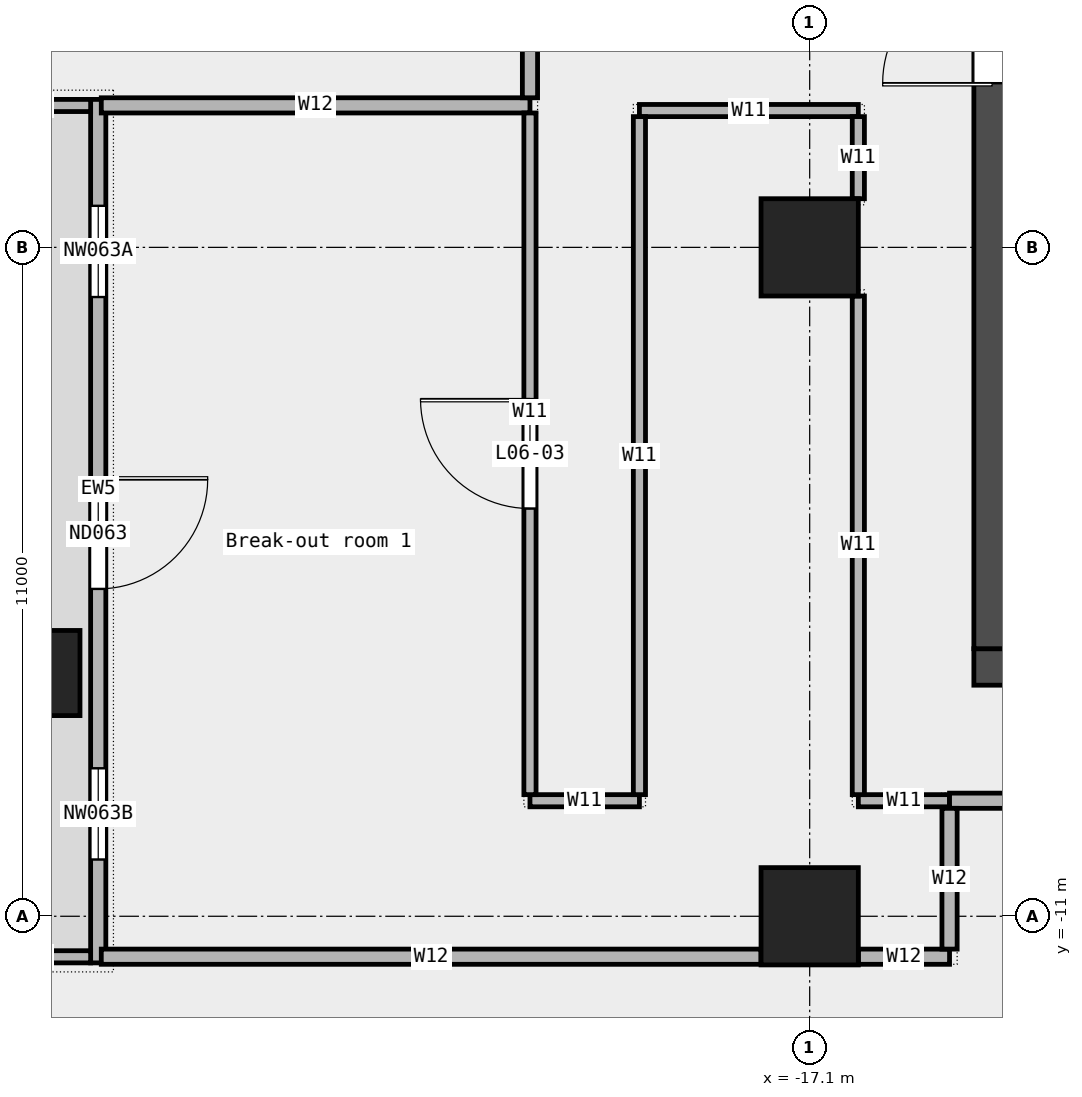
"""IFC4 building model, lengths in metres.
Left out: names, types, materials, properties, quantities, classifications, styles, units other than length and angle.
Written with IfcOpenShell. Run it as: python <this file> out.ifc"""

import sys

from ifc_helpers import new_model, si_unit, direction, frame, frame_2d, origin, origin_2d, place, context, subcontext, project, spatial, rectangle, extrude, element, fill, save


model = new_model("IFC4")
c1 = context("Model", 3, precision=1e-05, world=origin(), true_north=direction((0.0, 1.0)))
c2 = subcontext(c1, "Body", "Model", "MODEL_VIEW")
j1 = project(units=[si_unit("LENGTHUNIT", "METRE"), si_unit("PLANEANGLEUNIT", "RADIAN")], contexts=[c1])
p1 = place(None, origin())
s1 = spatial("IfcSite", under=j1, at=p1, CompositionType="ELEMENT")
p2 = place(p1, origin())
s2 = spatial("IfcBuilding", under=s1, at=p2, CompositionType="ELEMENT")
p3 = place(p2, frame((0.0, 0.0, 35.8)))
s3 = spatial("IfcBuildingStorey", under=s2, at=p3, CompositionType="ELEMENT", Elevation=35.8)
p4 = place(p3, frame((-29.8, -7.0, 0.0), z_axis=(0.0, 0.0, 1.0), x_axis=(1.0, 0.0, 0.0)))
e1 = element("IfcColumn", 1, at=p4, inside=s3, PredefinedType="COLUMN", context=c2, shape_type="SweptSolid", body=[
    extrude(rectangle(XDim=1.4, YDim=1.4, at=origin_2d()), origin(), (0.0, 0.0, 1.0), 4.35),
])
for number, where, z_axis, x_axis in (
    (2, (-17.1, -11.0, 0.0), (0.0, 0.0, 1.0), (1.0, 0.0, 0.0)),
    (3, (-17.1, 0.0, 0.0), (0.0, 0.0, 1.0), (1.0, 0.0, 0.0)),
):
    element("IfcColumn", number, at=place(p3, frame(where, z_axis=z_axis, x_axis=x_axis)), inside=s3, PredefinedType="COLUMN", context=c2, shape_type="SweptSolid", body=[
        extrude(rectangle(XDim=1.6, YDim=1.6, at=origin_2d()), origin(), (0.0, 0.0, 1.0), 4.35),
    ])
p5 = place(p3, frame((-28.8, 2.433, 0.0), z_axis=(0.0, 0.0, 1.0), x_axis=(0.0, -1.0, 0.0)))
e4 = element("IfcWall", 4, at=p5, inside=s3, PredefinedType="STANDARD", context=c2, shape_type="SweptSolid", body=[
    extrude(rectangle(XDim=14.2, YDim=0.25, at=frame_2d((7.1, 0.0))), origin(), (0.0, 0.0, 1.0), 4.35),
])
p6 = place(p5, frame((1.75, 0.0, 0.45)))
e5 = element("IfcOpeningElement", 5, at=p6, cuts=e4, PredefinedType="OPENING", context=c2, shape_type="SweptSolid", body=[
    extrude(rectangle(XDim=1.5, YDim=3.0, at=frame_2d((0.75, 1.5))), frame((0.0, 0.137, 0.0), z_axis=(0.0, -1.0, 0.0), x_axis=(1.0, 0.0, 0.0)), (0.0, 0.0, 1.0), 0.274),
])
p7 = place(p5, frame((6.25, 0.0, 0.0)))
e6 = element("IfcOpeningElement", 6, at=p7, cuts=e4, PredefinedType="OPENING", context=c2, shape_type="SweptSolid", body=[
    extrude(rectangle(XDim=1.8, YDim=2.4, at=frame_2d((0.9, 1.2))), frame((0.0, 0.137, 0.0), z_axis=(0.0, -1.0, 0.0), x_axis=(1.0, 0.0, 0.0)), (0.0, 0.0, 1.0), 0.274),
])
p8 = place(p5, frame((11.0, 0.0, 0.45)))
e7 = element("IfcOpeningElement", 7, at=p8, cuts=e4, PredefinedType="OPENING", context=c2, shape_type="SweptSolid", body=[
    extrude(rectangle(XDim=1.5, YDim=3.0, at=frame_2d((0.75, 1.5))), frame((0.0, 0.137, 0.0), z_axis=(0.0, -1.0, 0.0), x_axis=(1.0, 0.0, 0.0)), (0.0, 0.0, 1.0), 0.274),
])
for number, where, z_axis, x_axis in (
    (8, (-30.8, 2.333, 0.0), (0.0, 0.0, 1.0), (1.0, 0.0, 0.0)),
    (9, (-30.8, -11.667, 0.0), (0.0, 0.0, 1.0), (1.0, 0.0, 0.0)),
):
    element("IfcWall", number, at=place(p3, frame(where, z_axis=z_axis, x_axis=x_axis)), inside=s3, PredefinedType="STANDARD", context=c2, shape_type="SweptSolid", body=[
        extrude(rectangle(XDim=1.875, YDim=0.2, at=frame_2d((0.938, 0.0))), origin(), (0.0, 0.0, 1.0), 4.35),
    ])
p9 = place(p3, frame((-28.75, -11.665, 0.0), z_axis=(0.0, 0.0, 1.0), x_axis=(1.0, 0.0, 0.0)))
e10 = element("IfcWall", 10, at=p9, inside=s3, PredefinedType="PARTITIONING", context=c2, shape_type="SweptSolid", body=[
    extrude(rectangle(XDim=10.85, YDim=0.25, at=frame_2d((5.425, 0.0))), origin(), (0.0, 0.0, 1.0), 4.35),
])
p10 = place(p3, frame((-16.3, -11.665, 0.0), z_axis=(0.0, 0.0, 1.0), x_axis=(1.0, 0.0, 0.0)))
e11 = element("IfcWall", 11, at=p10, inside=s3, PredefinedType="PARTITIONING", context=c2, shape_type="SweptSolid", body=[
    extrude(rectangle(XDim=1.5, YDim=0.25, at=frame_2d((0.75, 0.0))), origin(), (0.0, 0.0, 1.0), 4.35),
])
p11 = place(p3, frame((-21.7, -9.1, 0.0), z_axis=(0.0, 0.0, 1.0), x_axis=(1.0, 0.0, 0.0)))
e12 = element("IfcWall", 12, at=p11, inside=s3, PredefinedType="PARTITIONING", context=c2, shape_type="SweptSolid", body=[
    extrude(rectangle(XDim=1.8, YDim=0.2, at=frame_2d((0.9, 0.0))), origin(), (0.0, 0.0, 1.0), 4.35),
])
p12 = place(p3, frame((-16.3, -9.1, 0.0), z_axis=(0.0, 0.0, 1.0), x_axis=(1.0, 0.0, 0.0)))
e13 = element("IfcWall", 13, at=p12, inside=s3, PredefinedType="PARTITIONING", context=c2, shape_type="SweptSolid", body=[
    extrude(rectangle(XDim=1.5, YDim=0.2, at=frame_2d((0.75, 0.0))), origin(), (0.0, 0.0, 1.0), 4.35),
])
p13 = place(p3, frame((-14.8, -9.1, 0.0), z_axis=(0.0, 0.0, 1.0), x_axis=(1.0, 0.0, 0.0)))
e14 = element("IfcWall", 14, at=p13, inside=s3, PredefinedType="PARTITIONING", context=c2, shape_type="SweptSolid", body=[
    extrude(rectangle(XDim=29.6, YDim=0.25, at=frame_2d((14.8, 0.0))), origin(), (0.0, 0.0, 1.0), 4.35),
])
p14 = place(p13, frame((22.998, 0.0, 0.0)))
e15 = element("IfcOpeningElement", 15, at=p14, cuts=e14, PredefinedType="OPENING", context=c2, shape_type="SweptSolid", body=[
    extrude(rectangle(XDim=1.8, YDim=2.1, at=frame_2d((0.9, 1.05))), frame((0.0, 0.137, 0.0), z_axis=(0.0, -1.0, 0.0), x_axis=(1.0, 0.0, 0.0)), (0.0, 0.0, 1.0), 0.274),
])
p15 = place(p13, frame((9.998, 0.0, 0.0)))
e16 = element("IfcOpeningElement", 16, at=p15, cuts=e14, PredefinedType="OPENING", context=c2, shape_type="SweptSolid", body=[
    extrude(rectangle(XDim=1.8, YDim=2.1, at=frame_2d((0.9, 1.05))), frame((0.0, 0.137, 0.0), z_axis=(0.0, -1.0, 0.0), x_axis=(1.0, 0.0, 0.0)), (0.0, 0.0, 1.0), 0.274),
])
p16 = place(p3, frame((-19.9, 2.25, 0.0), z_axis=(0.0, 0.0, 1.0), x_axis=(1.0, 0.0, 0.0)))
e17 = element("IfcWall", 17, at=p16, inside=s3, PredefinedType="PARTITIONING", context=c2, shape_type="SweptSolid", body=[
    extrude(rectangle(XDim=3.6, YDim=0.2, at=frame_2d((1.8, 0.0))), origin(), (0.0, 0.0, 1.0), 4.35),
])
p17 = place(p3, frame((-28.75, 2.335, 0.0), z_axis=(0.0, 0.0, 1.0), x_axis=(1.0, 0.0, 0.0)))
e18 = element("IfcWall", 18, at=p17, inside=s3, PredefinedType="PARTITIONING", context=c2, shape_type="SweptSolid", body=[
    extrude(rectangle(XDim=7.05, YDim=0.25, at=frame_2d((3.525, 0.0))), origin(), (0.0, 0.0, 1.0), 4.35),
])
p18 = place(p3, frame((-21.7, -9.0, 0.0), z_axis=(0.0, 0.0, 1.0), x_axis=(0.0, 1.0, 0.0)))
e19 = element("IfcWall", 19, at=p18, inside=s3, PredefinedType="PARTITIONING", context=c2, shape_type="SweptSolid", body=[
    extrude(rectangle(XDim=11.21, YDim=0.2, at=frame_2d((5.605, 0.0))), origin(), (0.0, 0.0, 1.0), 4.35),
])
p19 = place(p18, frame((4.705, 0.0, 0.0)))
e20 = element("IfcOpeningElement", 20, at=p19, cuts=e19, PredefinedType="OPENING", context=c2, shape_type="SweptSolid", body=[
    extrude(rectangle(XDim=1.8, YDim=2.1, at=frame_2d((0.9, 1.05))), frame((0.0, 0.112, 0.0), z_axis=(0.0, -1.0, 0.0), x_axis=(1.0, 0.0, 0.0)), (0.0, 0.0, 1.0), 0.224),
])
p20 = place(p3, frame((-21.7, 2.46, 0.0), z_axis=(0.0, 0.0, 1.0), x_axis=(0.0, 1.0, 0.0)))
e21 = element("IfcWall", 21, at=p20, inside=s3, PredefinedType="PARTITIONING", context=c2, shape_type="SweptSolid", body=[
    extrude(rectangle(XDim=12.79, YDim=0.25, at=frame_2d((6.395, 0.0))), origin(), (0.0, 0.0, 1.0), 4.35),
])
p21 = place(p20, frame((5.495, 0.0, 0.0)))
e22 = element("IfcOpeningElement", 22, at=p21, cuts=e21, PredefinedType="OPENING", context=c2, shape_type="SweptSolid", body=[
    extrude(rectangle(XDim=1.8, YDim=2.1, at=frame_2d((0.9, 1.05))), frame((0.0, 0.137, 0.0), z_axis=(0.0, -1.0, 0.0), x_axis=(1.0, 0.0, 0.0)), (0.0, 0.0, 1.0), 0.274),
])
p22 = place(p3, frame((-19.9, -9.0, 0.0), z_axis=(0.0, 0.0, 1.0), x_axis=(0.0, 1.0, 0.0)))
e23 = element("IfcWall", 23, at=p22, inside=s3, PredefinedType="PARTITIONING", context=c2, shape_type="SweptSolid", body=[
    extrude(rectangle(XDim=11.15, YDim=0.2, at=frame_2d((5.575, 0.0))), origin(), (0.0, 0.0, 1.0), 4.35),
])
p23 = place(p3, frame((-16.3, -9.0, 0.0), z_axis=(0.0, 0.0, 1.0), x_axis=(0.0, 1.0, 0.0)))
e24 = element("IfcWall", 24, at=p23, inside=s3, PredefinedType="PARTITIONING", context=c2, shape_type="SweptSolid", body=[
    extrude(rectangle(XDim=8.2, YDim=0.2, at=frame_2d((4.1, 0.0))), origin(), (0.0, 0.0, 1.0), 4.35),
])
p24 = place(p3, frame((-16.3, 0.8, 0.0), z_axis=(0.0, 0.0, 1.0), x_axis=(0.0, 1.0, 0.0)))
e25 = element("IfcWall", 25, at=p24, inside=s3, PredefinedType="PARTITIONING", context=c2, shape_type="SweptSolid", body=[
    extrude(rectangle(XDim=1.35, YDim=0.2, at=frame_2d((0.675, 0.0))), origin(), (0.0, 0.0, 1.0), 4.35),
])
p25 = place(p3, frame((-14.8, -11.54, 0.0), z_axis=(0.0, 0.0, 1.0), x_axis=(0.0, 1.0, 0.0)))
e26 = element("IfcWall", 26, at=p25, inside=s3, PredefinedType="PARTITIONING", context=c2, shape_type="SweptSolid", body=[
    extrude(rectangle(XDim=2.315, YDim=0.25, at=frame_2d((1.157, 0.0))), origin(), (0.0, 0.0, 1.0), 4.35),
])
p26 = place(p3, frame((-14.4, -6.9, 0.0), z_axis=(0.0, 0.0, 1.0), x_axis=(1.0, 0.0, 0.0)))
e27 = element("IfcWall", 27, at=p26, inside=s3, PredefinedType="SHEAR", context=c2, shape_type="SweptSolid", body=[
    extrude(rectangle(XDim=28.8, YDim=0.6, at=frame_2d((14.4, 0.0))), origin(), (0.0, 0.0, 1.0), 4.5),
])
p27 = place(p26, frame((4.337, 0.0, 0.0)))
e28 = element("IfcOpeningElement", 28, at=p27, cuts=e27, PredefinedType="OPENING", context=c2, shape_type="SweptSolid", body=[
    extrude(rectangle(XDim=1.0, YDim=2.1, at=frame_2d((0.5, 1.05))), frame((0.0, 0.312, 0.0), z_axis=(0.0, -1.0, 0.0), x_axis=(1.0, 0.0, 0.0)), (0.0, 0.0, 1.0), 0.624),
])
p28 = place(p26, frame((6.212, 0.0, 0.0)))
e29 = element("IfcOpeningElement", 29, at=p28, cuts=e27, PredefinedType="OPENING", context=c2, shape_type="SweptSolid", body=[
    extrude(rectangle(XDim=1.0, YDim=2.1, at=frame_2d((0.5, 1.05))), frame((0.0, 0.312, 0.0), z_axis=(0.0, -1.0, 0.0), x_axis=(1.0, 0.0, 0.0)), (0.0, 0.0, 1.0), 0.624),
])
p29 = place(p26, frame((10.8, 0.0, 0.0)))
e30 = element("IfcOpeningElement", 30, at=p29, cuts=e27, PredefinedType="OPENING", context=c2, shape_type="SweptSolid", body=[
    extrude(rectangle(XDim=1.2, YDim=2.1, at=frame_2d((0.6, 1.05))), frame((0.0, 0.312, 0.0), z_axis=(0.0, -1.0, 0.0), x_axis=(1.0, 0.0, 0.0)), (0.0, 0.0, 1.0), 0.624),
])
p30 = place(p26, frame((15.587, 0.0, 0.0)))
e31 = element("IfcOpeningElement", 31, at=p30, cuts=e27, PredefinedType="OPENING", context=c2, shape_type="SweptSolid", body=[
    extrude(rectangle(XDim=1.0, YDim=2.1, at=frame_2d((0.5, 1.05))), frame((0.0, 0.312, 0.0), z_axis=(0.0, -1.0, 0.0), x_axis=(1.0, 0.0, 0.0)), (0.0, 0.0, 1.0), 0.624),
])
p31 = place(p26, frame((18.75, 0.0, 0.0)))
e32 = element("IfcOpeningElement", 32, at=p31, cuts=e27, PredefinedType="OPENING", context=c2, shape_type="SweptSolid", body=[
    extrude(rectangle(XDim=1.8, YDim=2.1, at=frame_2d((0.9, 1.05))), frame((0.0, 0.312, 0.0), z_axis=(0.0, -1.0, 0.0), x_axis=(1.0, 0.0, 0.0)), (0.0, 0.0, 1.0), 0.624),
])
p32 = place(p26, frame((23.087, 0.0, 0.0)))
e33 = element("IfcOpeningElement", 33, at=p32, cuts=e27, PredefinedType="OPENING", context=c2, shape_type="SweptSolid", body=[
    extrude(rectangle(XDim=1.0, YDim=2.1, at=frame_2d((0.5, 1.05))), frame((0.0, 0.312, 0.0), z_axis=(0.0, -1.0, 0.0), x_axis=(1.0, 0.0, 0.0)), (0.0, 0.0, 1.0), 0.624),
])
p33 = place(p3, frame((-14.1, -6.6, 0.0), z_axis=(0.0, 0.0, 1.0), x_axis=(0.0, 1.0, 0.0)))
e34 = element("IfcWall", 34, at=p33, inside=s3, PredefinedType="SHEAR", context=c2, shape_type="SweptSolid", body=[
    extrude(rectangle(XDim=19.5, YDim=0.6, at=frame_2d((9.75, 0.0))), origin(), (0.0, 0.0, 1.0), 4.5),
])
p34 = place(p33, frame((9.3, 0.0, 0.0)))
e35 = element("IfcOpeningElement", 35, at=p34, cuts=e34, PredefinedType="OPENING", context=c2, shape_type="SweptSolid", body=[
    extrude(rectangle(XDim=1.8, YDim=2.1, at=frame_2d((0.9, 1.05))), frame((0.0, 0.312, 0.0), z_axis=(0.0, -1.0, 0.0), x_axis=(1.0, 0.0, 0.0)), (0.0, 0.0, 1.0), 0.624),
])
p35 = place(p6, origin())
e36 = element("IfcWindow", 36, at=p35, inside=s3, PartitioningType="SINGLE_PANEL", PredefinedType="WINDOW", context=c2, shape_type="SweptSolid", body=[
    extrude(rectangle(XDim=1.5, YDim=3.0, at=frame_2d((0.75, 1.5))), frame((0.0, 0.03, 0.0), z_axis=(0.0, -1.0, 0.0), x_axis=(1.0, 0.0, 0.0)), (0.0, 0.0, 1.0), 0.06),
])
fill(e5, e36)
p36 = place(p7, origin())
e37 = element("IfcDoor", 37, at=p36, inside=s3, OperationType="DOUBLE_DOOR_SINGLE_SWING", PredefinedType="DOOR", context=c2, shape_type="SweptSolid", body=[
    extrude(rectangle(XDim=1.8, YDim=2.4, at=frame_2d((0.9, 1.2))), frame((0.0, 0.025, 0.0), z_axis=(0.0, -1.0, 0.0), x_axis=(1.0, 0.0, 0.0)), (0.0, 0.0, 1.0), 0.05),
])
fill(e6, e37)
p37 = place(p8, origin())
e38 = element("IfcWindow", 38, at=p37, inside=s3, PartitioningType="SINGLE_PANEL", PredefinedType="WINDOW", context=c2, shape_type="SweptSolid", body=[
    extrude(rectangle(XDim=1.5, YDim=3.0, at=frame_2d((0.75, 1.5))), frame((0.0, 0.03, 0.0), z_axis=(0.0, -1.0, 0.0), x_axis=(1.0, 0.0, 0.0)), (0.0, 0.0, 1.0), 0.06),
])
fill(e7, e38)
p38 = place(p19, origin())
e39 = element("IfcDoor", 39, at=p38, inside=s3, OperationType="DOUBLE_DOOR_SINGLE_SWING", PredefinedType="DOOR", context=c2, shape_type="SweptSolid", body=[
    extrude(rectangle(XDim=1.8, YDim=2.1, at=frame_2d((0.9, 1.05))), frame((0.0, 0.025, 0.0), z_axis=(0.0, -1.0, 0.0), x_axis=(1.0, 0.0, 0.0)), (0.0, 0.0, 1.0), 0.05),
])
fill(e20, e39)
p39 = place(p34, origin())
e40 = element("IfcDoor", 40, at=p39, inside=s3, OperationType="DOUBLE_DOOR_SINGLE_SWING", PredefinedType="DOOR", context=c2, shape_type="SweptSolid", body=[
    extrude(rectangle(XDim=1.8, YDim=2.1, at=frame_2d((0.9, 1.05))), frame((0.0, 0.025, 0.0), z_axis=(0.0, -1.0, 0.0), x_axis=(1.0, 0.0, 0.0)), (0.0, 0.0, 1.0), 0.05),
])
fill(e35, e40)
save(model, sys.argv[1])
